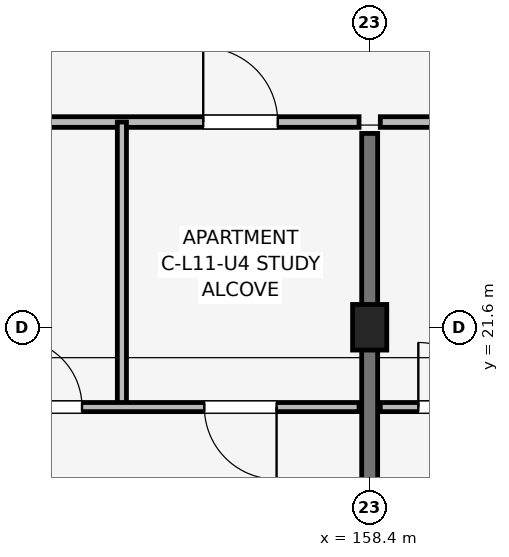
"""IFC4 building model, lengths in metres.
Left out: names, types, materials, properties, quantities, classifications, styles, units other than length and angle.
Written with IfcOpenShell. Run it as: python <this file> out.ifc"""

import sys

from ifc_helpers import new_model, si_unit, direction, frame, frame_2d, origin, origin_2d, place, context, subcontext, project, spatial, rectangle, extrude, element, fill, save


model = new_model("IFC4")
c1 = context("Model", 3, precision=1e-05, world=origin(), true_north=direction((0.0, 1.0)))
c2 = subcontext(c1, "Body", "Model", "MODEL_VIEW")
j1 = project(units=[si_unit("LENGTHUNIT", "METRE"), si_unit("PLANEANGLEUNIT", "RADIAN")], contexts=[c1])
p1 = place(None, origin())
s1 = spatial("IfcSite", under=j1, at=p1, CompositionType="ELEMENT")
p2 = place(p1, origin())
s2 = spatial("IfcBuilding", under=s1, at=p2, CompositionType="ELEMENT")
p3 = place(p2, frame((0.0, 0.0, 37.05)))
s3 = spatial("IfcBuildingStorey", under=s2, at=p3, CompositionType="ELEMENT", Elevation=37.05)
p4 = place(p3, frame((158.4, 21.6, 0.0), z_axis=(0.0, 0.0, 1.0), x_axis=(1.0, 0.0, 0.0)))
e1 = element("IfcColumn", 1, at=p4, inside=s3, PredefinedType="COLUMN", context=c2, shape_type="SweptSolid", body=[
    extrude(rectangle(XDim=0.45, YDim=0.6, at=origin_2d()), origin(), (0.0, 0.0, 1.0), 3.15),
])
p5 = place(p3, frame((158.4, 14.75, 0.0), z_axis=(0.0, 0.0, 1.0), x_axis=(0.0, 1.0, 0.0)))
e2 = element("IfcWall", 2, at=p5, inside=s3, PredefinedType="SHEAR", context=c2, shape_type="SweptSolid", body=[
    extrude(rectangle(XDim=9.4, YDim=0.21, at=frame_2d((4.7, 0.0))), origin(), (0.0, 0.0, 1.0), 3.15),
])
p6 = place(p3, frame((151.34, 24.3, 0.0), z_axis=(0.0, 0.0, 1.0), x_axis=(1.0, 0.0, 0.0)))
e3 = element("IfcWall", 3, at=p6, inside=s3, PredefinedType="PARTITIONING", context=c2, shape_type="SweptSolid", body=[
    extrude(rectangle(XDim=6.92, YDim=0.14, at=frame_2d((3.46, 0.0))), origin(), (0.0, 0.0, 1.0), 2.38),
])
p7 = place(p6, frame((4.87, 0.0, 0.0)))
e4 = element("IfcOpeningElement", 4, at=p7, cuts=e3, PredefinedType="OPENING", context=c2, shape_type="SweptSolid", body=[
    extrude(rectangle(XDim=0.98, YDim=2.1, at=frame_2d((0.49, 1.05))), frame((0.0, 0.08, 0.0), z_axis=(0.0, -1.0, 0.0), x_axis=(1.0, 0.0, 0.0)), (0.0, 0.0, 1.0), 0.16),
])
p8 = place(p3, frame((155.14, 20.55, 0.0), z_axis=(0.0, 0.0, 1.0), x_axis=(0.0, 1.0, 0.0)))
e5 = element("IfcWall", 5, at=p8, inside=s3, PredefinedType="PARTITIONING", context=c2, shape_type="SweptSolid", body=[
    extrude(rectangle(XDim=3.75, YDim=0.12, at=frame_2d((1.875, 0.0))), origin(), (0.0, 0.0, 1.0), 2.38),
])
p9 = place(p3, frame((151.34, 20.55, 0.0), z_axis=(0.0, 0.0, 1.0), x_axis=(1.0, 0.0, 0.0)))
e6 = element("IfcWall", 6, at=p9, inside=s3, PredefinedType="PARTITIONING", context=c2, shape_type="SweptSolid", body=[
    extrude(rectangle(XDim=6.92, YDim=0.12, at=frame_2d((3.46, 0.0))), origin(), (0.0, 0.0, 1.0), 2.38),
])
p10 = place(p9, frame((1.35, 0.0, 0.0), z_axis=(0.0, 0.0, 1.0), x_axis=(-1.0, 0.0, 0.0)))
e7 = element("IfcOpeningElement", 7, at=p10, cuts=e6, PredefinedType="OPENING", context=c2, shape_type="SweptSolid", body=[
    extrude(rectangle(XDim=0.85, YDim=2.08, at=frame_2d((0.425, 1.04))), frame((0.0, 0.07, 0.0), z_axis=(0.0, -1.0, 0.0), x_axis=(1.0, 0.0, 0.0)), (0.0, 0.0, 1.0), 0.14),
])
p11 = place(p9, frame((2.375, 0.0, 0.0)))
e8 = element("IfcOpeningElement", 8, at=p11, cuts=e6, PredefinedType="OPENING", context=c2, shape_type="SweptSolid", body=[
    extrude(rectangle(XDim=0.9, YDim=2.08, at=frame_2d((0.45, 1.04))), frame((0.0, 0.07, 0.0), z_axis=(0.0, -1.0, 0.0), x_axis=(1.0, 0.0, 0.0)), (0.0, 0.0, 1.0), 0.14),
])
p12 = place(p9, frame((5.835, 0.0, 0.0), z_axis=(0.0, 0.0, 1.0), x_axis=(-1.0, 0.0, 0.0)))
e9 = element("IfcOpeningElement", 9, at=p12, cuts=e6, PredefinedType="OPENING", context=c2, shape_type="SweptSolid", body=[
    extrude(rectangle(XDim=0.95, YDim=2.08, at=frame_2d((0.475, 1.04))), frame((0.0, 0.07, 0.0), z_axis=(0.0, -1.0, 0.0), x_axis=(1.0, 0.0, 0.0)), (0.0, 0.0, 1.0), 0.14),
])
p13 = place(p3, frame((158.54, 24.3, 0.0), z_axis=(0.0, 0.0, 1.0), x_axis=(1.0, 0.0, 0.0)))
e10 = element("IfcWall", 10, at=p13, inside=s3, PredefinedType="PARTITIONING", context=c2, shape_type="SweptSolid", body=[
    extrude(rectangle(XDim=6.92, YDim=0.14, at=frame_2d((3.46, 0.0))), origin(), (0.0, 0.0, 1.0), 2.38),
])
p14 = place(p13, frame((4.875, 0.0, 0.0), z_axis=(0.0, 0.0, 1.0), x_axis=(-1.0, 0.0, 0.0)))
e11 = element("IfcOpeningElement", 11, at=p14, cuts=e10, PredefinedType="OPENING", context=c2, shape_type="SweptSolid", body=[
    extrude(rectangle(XDim=0.98, YDim=2.1, at=frame_2d((0.49, 1.05))), frame((0.0, 0.08, 0.0), z_axis=(0.0, -1.0, 0.0), x_axis=(1.0, 0.0, 0.0)), (0.0, 0.0, 1.0), 0.16),
])
p15 = place(p3, frame((158.54, 20.55, 0.0), z_axis=(0.0, 0.0, 1.0), x_axis=(1.0, 0.0, 0.0)))
e12 = element("IfcWall", 12, at=p15, inside=s3, PredefinedType="PARTITIONING", context=c2, shape_type="SweptSolid", body=[
    extrude(rectangle(XDim=6.92, YDim=0.12, at=frame_2d((3.46, 0.0))), origin(), (0.0, 0.0, 1.0), 2.38),
])
p16 = place(p15, frame((0.5, 0.0, 0.0)))
e13 = element("IfcOpeningElement", 13, at=p16, cuts=e12, PredefinedType="OPENING", context=c2, shape_type="SweptSolid", body=[
    extrude(rectangle(XDim=0.85, YDim=2.08, at=frame_2d((0.425, 1.04))), frame((0.0, 0.07, 0.0), z_axis=(0.0, -1.0, 0.0), x_axis=(1.0, 0.0, 0.0)), (0.0, 0.0, 1.0), 0.14),
])
p17 = place(p15, frame((3.155, 0.0, 0.0), z_axis=(0.0, 0.0, 1.0), x_axis=(-1.0, 0.0, 0.0)))
e14 = element("IfcOpeningElement", 14, at=p17, cuts=e12, PredefinedType="OPENING", context=c2, shape_type="SweptSolid", body=[
    extrude(rectangle(XDim=0.9, YDim=2.08, at=frame_2d((0.45, 1.04))), frame((0.0, 0.07, 0.0), z_axis=(0.0, -1.0, 0.0), x_axis=(1.0, 0.0, 0.0)), (0.0, 0.0, 1.0), 0.14),
])
p18 = place(p15, frame((3.91, 0.0, 0.0)))
e15 = element("IfcOpeningElement", 15, at=p18, cuts=e12, PredefinedType="OPENING", context=c2, shape_type="SweptSolid", body=[
    extrude(rectangle(XDim=0.95, YDim=2.08, at=frame_2d((0.475, 1.04))), frame((0.0, 0.07, 0.0), z_axis=(0.0, -1.0, 0.0), x_axis=(1.0, 0.0, 0.0)), (0.0, 0.0, 1.0), 0.14),
])
p19 = place(p7, origin())
e16 = element("IfcDoor", 16, at=p19, inside=s3, OperationType="SINGLE_SWING_LEFT", PredefinedType="DOOR", context=c2, shape_type="SweptSolid", body=[
    extrude(rectangle(XDim=0.98, YDim=2.1, at=frame_2d((0.49, 1.05))), frame((0.0, 0.025, 0.0), z_axis=(0.0, -1.0, 0.0), x_axis=(1.0, 0.0, 0.0)), (0.0, 0.0, 1.0), 0.05),
])
fill(e4, e16)
p20 = place(p11, origin())
e17 = element("IfcDoor", 17, at=p20, inside=s3, OperationType="SINGLE_SWING_LEFT", PredefinedType="DOOR", context=c2, shape_type="SweptSolid", body=[
    extrude(rectangle(XDim=0.9, YDim=2.08, at=frame_2d((0.45, 1.04))), frame((0.0, 0.025, 0.0), z_axis=(0.0, -1.0, 0.0), x_axis=(1.0, 0.0, 0.0)), (0.0, 0.0, 1.0), 0.05),
])
fill(e8, e17)
p21 = place(p12, origin())
e18 = element("IfcDoor", 18, at=p21, inside=s3, OperationType="SINGLE_SWING_RIGHT", PredefinedType="DOOR", context=c2, shape_type="SweptSolid", body=[
    extrude(rectangle(XDim=0.95, YDim=2.08, at=frame_2d((0.475, 1.04))), frame((0.0, 0.025, 0.0), z_axis=(0.0, -1.0, 0.0), x_axis=(1.0, 0.0, 0.0)), (0.0, 0.0, 1.0), 0.05),
])
fill(e9, e18)
p22 = place(p16, origin())
e19 = element("IfcDoor", 19, at=p22, inside=s3, OperationType="SINGLE_SWING_LEFT", PredefinedType="DOOR", context=c2, shape_type="SweptSolid", body=[
    extrude(rectangle(XDim=0.85, YDim=2.08, at=frame_2d((0.425, 1.04))), frame((0.0, 0.025, 0.0), z_axis=(0.0, -1.0, 0.0), x_axis=(1.0, 0.0, 0.0)), (0.0, 0.0, 1.0), 0.05),
])
fill(e13, e19)
save(model, sys.argv[1])
